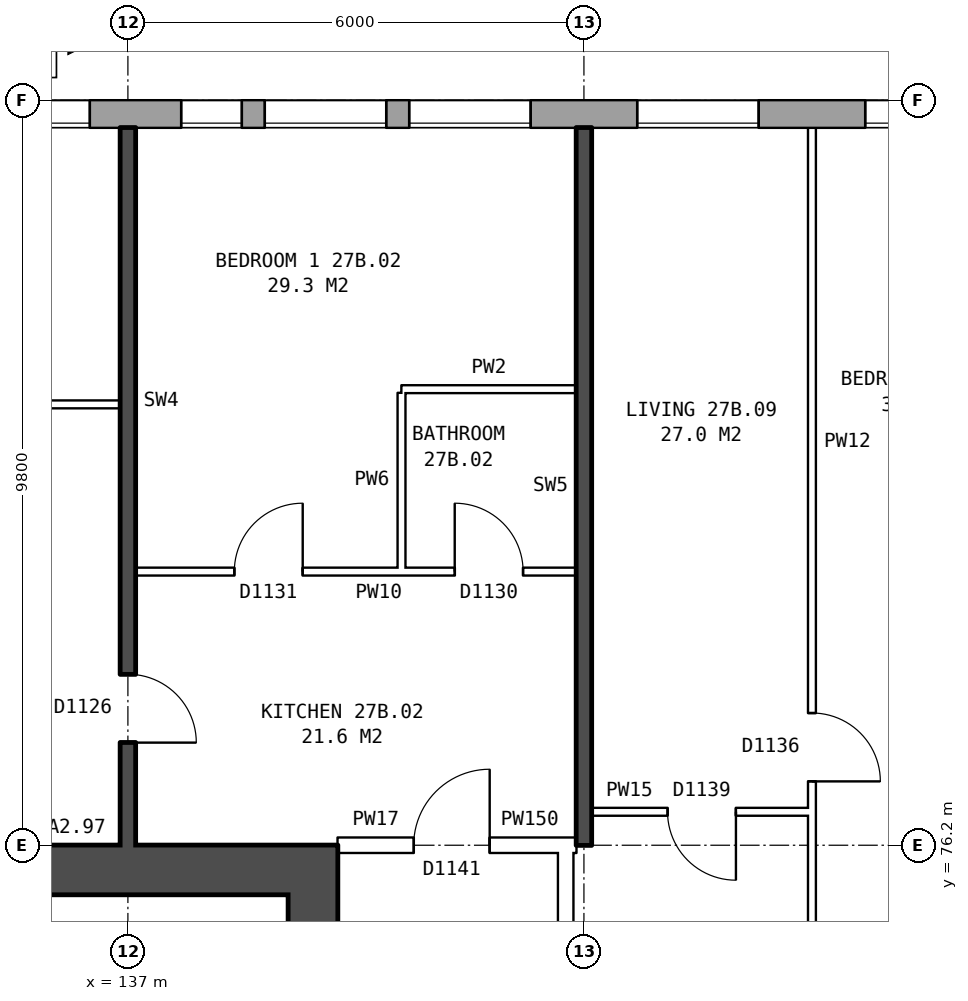
"""IFC4 building model, lengths in metres.
Left out: names, types, materials, properties, quantities, classifications, styles, units other than length and angle.
Written with IfcOpenShell. Run it as: python <this file> out.ifc"""

import sys

from ifc_helpers import new_model, si_unit, direction, frame, frame_2d, origin, place, context, subcontext, project, spatial, rectangle, extrude, element, fill, save


model = new_model("IFC4")
c1 = context("Model", 3, precision=1e-05, world=origin(), true_north=direction((0.0, 1.0)))
c2 = subcontext(c1, "Body", "Model", "MODEL_VIEW")
j1 = project(units=[si_unit("LENGTHUNIT", "METRE"), si_unit("PLANEANGLEUNIT", "RADIAN")], contexts=[c1])
p1 = place(None, origin())
s1 = spatial("IfcSite", under=j1, at=p1, CompositionType="ELEMENT")
p2 = place(p1, origin())
s2 = spatial("IfcBuilding", under=s1, at=p2, CompositionType="ELEMENT")
p3 = place(p2, frame((0.0, 0.0, 99.5)))
s3 = spatial("IfcBuildingStorey", under=s2, at=p3, CompositionType="ELEMENT", Elevation=99.5)
p4 = place(p3, frame((170.925, 85.82, 0.0), z_axis=(0.0, 0.0, 1.0), x_axis=(-1.0, 0.0, 0.0)))
e1 = element("IfcWall", 1, at=p4, inside=s3, PredefinedType="STANDARD", context=c2, shape_type="SweptSolid", body=[
    extrude(rectangle(XDim=36.851, YDim=0.36, at=frame_2d((18.425, 0.0))), origin(), (0.0, 0.0, 1.0), 2.85),
])
p5 = place(p4, frame((0.3, 0.0, 0.8)))
e2 = element("IfcOpeningElement", 2, at=p5, cuts=e1, PredefinedType="OPENING", context=c2, shape_type="SweptSolid", body=[
    extrude(rectangle(XDim=1.0, YDim=1.8, at=frame_2d((0.5, 0.9))), frame((0.0, 0.19, 0.0), z_axis=(0.0, -1.0, 0.0), x_axis=(1.0, 0.0, 0.0)), (0.0, 0.0, 1.0), 0.38),
])
p6 = place(p4, frame((4.625, 0.0, 0.8)))
e3 = element("IfcOpeningElement", 3, at=p6, cuts=e1, PredefinedType="OPENING", context=c2, shape_type="SweptSolid", body=[
    extrude(rectangle(XDim=1.6, YDim=1.8, at=frame_2d((0.8, 0.9))), frame((0.0, 0.19, 0.0), z_axis=(0.0, -1.0, 0.0), x_axis=(1.0, 0.0, 0.0)), (0.0, 0.0, 1.0), 0.38),
])
p7 = place(p4, frame((7.625, 0.0, 0.8)))
e4 = element("IfcOpeningElement", 4, at=p7, cuts=e1, PredefinedType="OPENING", context=c2, shape_type="SweptSolid", body=[
    extrude(rectangle(XDim=1.6, YDim=1.8, at=frame_2d((0.8, 0.9))), frame((0.0, 0.19, 0.0), z_axis=(0.0, -1.0, 0.0), x_axis=(1.0, 0.0, 0.0)), (0.0, 0.0, 1.0), 0.38),
])
p8 = place(p4, frame((10.625, 0.0, 0.8)))
e5 = element("IfcOpeningElement", 5, at=p8, cuts=e1, PredefinedType="OPENING", context=c2, shape_type="SweptSolid", body=[
    extrude(rectangle(XDim=1.6, YDim=1.8, at=frame_2d((0.8, 0.9))), frame((0.0, 0.19, 0.0), z_axis=(0.0, -1.0, 0.0), x_axis=(1.0, 0.0, 0.0)), (0.0, 0.0, 1.0), 0.38),
])
p9 = place(p4, frame((13.625, 0.0, 0.8)))
e6 = element("IfcOpeningElement", 6, at=p9, cuts=e1, PredefinedType="OPENING", context=c2, shape_type="SweptSolid", body=[
    extrude(rectangle(XDim=1.6, YDim=1.8, at=frame_2d((0.8, 0.9))), frame((0.0, 0.19, 0.0), z_axis=(0.0, -1.0, 0.0), x_axis=(1.0, 0.0, 0.0)), (0.0, 0.0, 1.0), 0.38),
])
p10 = place(p4, frame((16.625, 0.0, 0.8)))
e7 = element("IfcOpeningElement", 7, at=p10, cuts=e1, PredefinedType="OPENING", context=c2, shape_type="SweptSolid", body=[
    extrude(rectangle(XDim=1.6, YDim=1.8, at=frame_2d((0.8, 0.9))), frame((0.0, 0.19, 0.0), z_axis=(0.0, -1.0, 0.0), x_axis=(1.0, 0.0, 0.0)), (0.0, 0.0, 1.0), 0.38),
])
p11 = place(p4, frame((19.625, 0.0, 0.8)))
e8 = element("IfcOpeningElement", 8, at=p11, cuts=e1, PredefinedType="OPENING", context=c2, shape_type="SweptSolid", body=[
    extrude(rectangle(XDim=1.6, YDim=1.8, at=frame_2d((0.8, 0.9))), frame((0.0, 0.19, 0.0), z_axis=(0.0, -1.0, 0.0), x_axis=(1.0, 0.0, 0.0)), (0.0, 0.0, 1.0), 0.38),
])
p12 = place(p4, frame((22.625, 0.0, 0.8)))
e9 = element("IfcOpeningElement", 9, at=p12, cuts=e1, PredefinedType="OPENING", context=c2, shape_type="SweptSolid", body=[
    extrude(rectangle(XDim=1.6, YDim=1.8, at=frame_2d((0.8, 0.9))), frame((0.0, 0.19, 0.0), z_axis=(0.0, -1.0, 0.0), x_axis=(1.0, 0.0, 0.0)), (0.0, 0.0, 1.0), 0.38),
])
p13 = place(p4, frame((25.625, 0.0, 0.8)))
e10 = element("IfcOpeningElement", 10, at=p13, cuts=e1, PredefinedType="OPENING", context=c2, shape_type="SweptSolid", body=[
    extrude(rectangle(XDim=1.6, YDim=1.8, at=frame_2d((0.8, 0.9))), frame((0.0, 0.19, 0.0), z_axis=(0.0, -1.0, 0.0), x_axis=(1.0, 0.0, 0.0)), (0.0, 0.0, 1.0), 0.38),
])
p14 = place(p4, frame((28.625, 0.0, 0.8)))
e11 = element("IfcOpeningElement", 11, at=p14, cuts=e1, PredefinedType="OPENING", context=c2, shape_type="SweptSolid", body=[
    extrude(rectangle(XDim=1.6, YDim=1.8, at=frame_2d((0.8, 0.9))), frame((0.0, 0.19, 0.0), z_axis=(0.0, -1.0, 0.0), x_axis=(1.0, 0.0, 0.0)), (0.0, 0.0, 1.0), 0.38),
])
p15 = place(p4, frame((30.525, 0.0, 0.8)))
e12 = element("IfcOpeningElement", 12, at=p15, cuts=e1, PredefinedType="OPENING", context=c2, shape_type="SweptSolid", body=[
    extrude(rectangle(XDim=1.6, YDim=1.8, at=frame_2d((0.8, 0.9))), frame((0.0, 0.19, 0.0), z_axis=(0.0, -1.0, 0.0), x_axis=(1.0, 0.0, 0.0)), (0.0, 0.0, 1.0), 0.38),
])
p16 = place(p4, frame((34.425, 0.0, 1.7)))
e13 = element("IfcOpeningElement", 13, at=p16, cuts=e1, PredefinedType="OPENING", context=c2, shape_type="SweptSolid", body=[
    extrude(rectangle(XDim=0.8, YDim=0.9, at=frame_2d((0.4, 0.45))), frame((0.0, 0.19, 0.0), z_axis=(0.0, -1.0, 0.0), x_axis=(1.0, 0.0, 0.0)), (0.0, 0.0, 1.0), 0.38),
])
p17 = place(p4, frame((1.6, 0.0, 1.7)))
e14 = element("IfcOpeningElement", 14, at=p17, cuts=e1, PredefinedType="OPENING", context=c2, shape_type="SweptSolid", body=[
    extrude(rectangle(XDim=0.8, YDim=0.9, at=frame_2d((0.4, 0.45))), frame((0.0, 0.19, 0.0), z_axis=(0.0, -1.0, 0.0), x_axis=(1.0, 0.0, 0.0)), (0.0, 0.0, 1.0), 0.38),
])
p18 = place(p4, frame((32.425, 0.0, 0.8)))
e15 = element("IfcOpeningElement", 15, at=p18, cuts=e1, PredefinedType="OPENING", context=c2, shape_type="SweptSolid", body=[
    extrude(rectangle(XDim=0.8, YDim=0.9, at=frame_2d((0.4, 0.45))), frame((0.0, 0.19, 0.0), z_axis=(0.0, -1.0, 0.0), x_axis=(1.0, 0.0, 0.0)), (0.0, 0.0, 1.0), 0.38),
])
p19 = place(p4, frame((35.525, 0.0, 0.8)))
e16 = element("IfcOpeningElement", 16, at=p19, cuts=e1, PredefinedType="OPENING", context=c2, shape_type="SweptSolid", body=[
    extrude(rectangle(XDim=1.0, YDim=1.8, at=frame_2d((0.5, 0.9))), frame((0.0, 0.19, 0.0), z_axis=(0.0, -1.0, 0.0), x_axis=(1.0, 0.0, 0.0)), (0.0, 0.0, 1.0), 0.38),
])
p20 = place(p3, frame((139.435, 64.45, 0.0), z_axis=(0.0, 0.0, 1.0), x_axis=(0.0, 1.0, 0.0)))
e17 = element("IfcWall", 17, at=p20, inside=s3, PredefinedType="SHEAR", context=c2, shape_type="SweptSolid", body=[
    extrude(rectangle(XDim=11.1, YDim=0.65, at=frame_2d((5.55, 0.0))), origin(), (0.0, 0.0, 1.0), 2.85),
])
p21 = place(p20, frame((0.675, 0.0, 0.0)))
e18 = element("IfcOpeningElement", 18, at=p21, cuts=e17, PredefinedType="OPENING", context=c2, shape_type="SweptSolid", body=[
    extrude(rectangle(XDim=1.1, YDim=2.1, at=frame_2d((0.55, 1.05))), frame((0.0, 0.335, 0.0), z_axis=(0.0, -1.0, 0.0), x_axis=(1.0, 0.0, 0.0)), (0.0, 0.0, 1.0), 0.67),
])
p22 = place(p20, frame((9.25, 0.0, 0.0)))
e19 = element("IfcOpeningElement", 19, at=p22, cuts=e17, PredefinedType="OPENING", context=c2, shape_type="SweptSolid", body=[
    extrude(rectangle(XDim=1.1, YDim=2.1, at=frame_2d((0.55, 1.05))), frame((0.0, 0.335, 0.0), z_axis=(0.0, -1.0, 0.0), x_axis=(1.0, 0.0, 0.0)), (0.0, 0.0, 1.0), 0.67),
])
p23 = place(p20, frame((7.475, 0.0, 0.0)))
e20 = element("IfcOpeningElement", 20, at=p23, cuts=e17, PredefinedType="OPENING", context=c2, shape_type="SweptSolid", body=[
    extrude(rectangle(XDim=0.85, YDim=2.1, at=frame_2d((0.425, 1.05))), frame((0.0, 0.335, 0.0), z_axis=(0.0, -1.0, 0.0), x_axis=(1.0, 0.0, 0.0)), (0.0, 0.0, 1.0), 0.67),
])
p24 = place(p3, frame((139.76, 75.875, 0.0), z_axis=(0.0, 0.0, 1.0), x_axis=(-1.0, 0.0, 0.0)))
e21 = element("IfcWall", 21, at=p24, inside=s3, PredefinedType="SHEAR", context=c2, shape_type="SweptSolid", body=[
    extrude(rectangle(XDim=8.4, YDim=0.65, at=frame_2d((4.2, 0.0))), origin(), (0.0, 0.0, 1.0), 2.85),
])
p25 = place(p3, frame((142.76, 63.9, 0.0), z_axis=(0.0, 0.0, 1.0), x_axis=(0.0, 1.0, 0.0)))
e22 = element("IfcWall", 22, at=p25, inside=s3, PredefinedType="PARTITIONING", context=c2, shape_type="SweptSolid", body=[
    extrude(rectangle(XDim=12.2, YDim=0.2, at=frame_2d((6.1, 0.0))), origin(), (0.0, 0.0, 1.0), 2.85),
])
p26 = place(p25, frame((5.1, 0.0, 0.0)))
e23 = element("IfcOpeningElement", 23, at=p26, cuts=e22, PredefinedType="OPENING", context=c2, shape_type="SweptSolid", body=[
    extrude(rectangle(XDim=2.0, YDim=2.1, at=frame_2d((1.0, 1.05))), frame((0.0, 0.11, 0.0), z_axis=(0.0, -1.0, 0.0), x_axis=(1.0, 0.0, 0.0)), (0.0, 0.0, 1.0), 0.22),
])
p27 = place(p3, frame((139.76, 76.2, 0.0), z_axis=(0.0, 0.0, 1.0), x_axis=(1.0, 0.0, 0.0)))
e24 = element("IfcWall", 24, at=p27, inside=s3, PredefinedType="PARTITIONING", context=c2, shape_type="SweptSolid", body=[
    extrude(rectangle(XDim=3.0, YDim=0.2, at=frame_2d((1.5, 0.0))), origin(), (0.0, 0.0, 1.0), 2.85),
])
p28 = place(p27, frame((1.0, 0.0, 0.0)))
e25 = element("IfcOpeningElement", 25, at=p28, cuts=e24, PredefinedType="OPENING", context=c2, shape_type="SweptSolid", body=[
    extrude(rectangle(XDim=1.0, YDim=2.1, at=frame_2d((0.5, 1.05))), frame((0.0, 0.11, 0.0), z_axis=(0.0, -1.0, 0.0), x_axis=(1.0, 0.0, 0.0)), (0.0, 0.0, 1.0), 0.22),
])
p29 = place(p3, frame((142.76, 76.2, 0.0), z_axis=(0.0, 0.0, 1.0), x_axis=(1.0, 0.0, 0.0)))
e26 = element("IfcWall", 26, at=p29, inside=s3, PredefinedType="PARTITIONING", context=c2, shape_type="SweptSolid", body=[
    extrude(rectangle(XDim=0.14, YDim=0.2, at=frame_2d((0.07, 0.0))), origin(), (0.0, 0.0, 1.0), 2.85),
])
p30 = place(p3, frame((143.1, 76.64, 0.0), z_axis=(0.0, 0.0, 1.0), x_axis=(1.0, 0.0, 0.0)))
e27 = element("IfcWall", 27, at=p30, inside=s3, PredefinedType="PARTITIONING", context=c2, shape_type="SweptSolid", body=[
    extrude(rectangle(XDim=2.9, YDim=0.1, at=frame_2d((1.45, 0.0))), origin(), (0.0, 0.0, 1.0), 2.85),
])
p31 = place(p30, frame((1.0, 0.0, 0.0)))
e28 = element("IfcOpeningElement", 28, at=p31, cuts=e27, PredefinedType="OPENING", context=c2, shape_type="SweptSolid", body=[
    extrude(rectangle(XDim=0.9, YDim=2.1, at=frame_2d((0.45, 1.05))), frame((0.0, 0.06, 0.0), z_axis=(0.0, -1.0, 0.0), x_axis=(1.0, 0.0, 0.0)), (0.0, 0.0, 1.0), 0.12),
])
p32 = place(p3, frame((137.1, 79.8, 0.0), z_axis=(0.0, 0.0, 1.0), x_axis=(1.0, 0.0, 0.0)))
e29 = element("IfcWall", 29, at=p32, inside=s3, PredefinedType="PARTITIONING", context=c2, shape_type="SweptSolid", body=[
    extrude(rectangle(XDim=5.8, YDim=0.1, at=frame_2d((2.9, 0.0))), origin(), (0.0, 0.0, 1.0), 2.85),
])
p33 = place(p32, frame((1.3, 0.0, 0.0)))
e30 = element("IfcOpeningElement", 30, at=p33, cuts=e29, PredefinedType="OPENING", context=c2, shape_type="SweptSolid", body=[
    extrude(rectangle(XDim=0.9, YDim=2.1, at=frame_2d((0.45, 1.05))), frame((0.0, 0.06, 0.0), z_axis=(0.0, -1.0, 0.0), x_axis=(1.0, 0.0, 0.0)), (0.0, 0.0, 1.0), 0.12),
])
p34 = place(p32, frame((4.2, 0.0, 0.0)))
e31 = element("IfcOpeningElement", 31, at=p34, cuts=e29, PredefinedType="OPENING", context=c2, shape_type="SweptSolid", body=[
    extrude(rectangle(XDim=0.9, YDim=2.1, at=frame_2d((0.45, 1.05))), frame((0.0, 0.06, 0.0), z_axis=(0.0, -1.0, 0.0), x_axis=(1.0, 0.0, 0.0)), (0.0, 0.0, 1.0), 0.12),
])
p35 = place(p3, frame((131.36, 82.0, 0.0), z_axis=(0.0, 0.0, 1.0), x_axis=(1.0, 0.0, 0.0)))
e32 = element("IfcWall", 32, at=p35, inside=s3, PredefinedType="PARTITIONING", context=c2, shape_type="SweptSolid", body=[
    extrude(rectangle(XDim=5.54, YDim=0.1, at=frame_2d((2.77, 0.0))), origin(), (0.0, 0.0, 1.0), 2.85),
])
p36 = place(p35, frame((2.32, 0.0, 0.0)))
e33 = element("IfcOpeningElement", 33, at=p36, cuts=e32, PredefinedType="OPENING", context=c2, shape_type="SweptSolid", body=[
    extrude(rectangle(XDim=0.9, YDim=2.1, at=frame_2d((0.45, 1.05))), frame((0.0, 0.06, 0.0), z_axis=(0.0, -1.0, 0.0), x_axis=(1.0, 0.0, 0.0)), (0.0, 0.0, 1.0), 0.12),
])
p37 = place(p3, frame((140.6, 82.2, 0.0), z_axis=(0.0, 0.0, 1.0), x_axis=(1.0, 0.0, 0.0)))
e34 = element("IfcWall", 34, at=p37, inside=s3, PredefinedType="PARTITIONING", context=c2, shape_type="SweptSolid", body=[
    extrude(rectangle(XDim=2.3, YDim=0.1, at=frame_2d((1.15, 0.0))), origin(), (0.0, 0.0, 1.0), 2.85),
])
p38 = place(p3, frame((137.0, 76.2, 0.0), z_axis=(0.0, 0.0, 1.0), x_axis=(0.0, 1.0, 0.0)))
e35 = element("IfcWall", 35, at=p38, inside=s3, PredefinedType="SOLIDWALL", context=c2, shape_type="SweptSolid", body=[
    extrude(rectangle(XDim=9.44, YDim=0.2, at=frame_2d((4.72, 0.0))), origin(), (0.0, 0.0, 1.0), 2.85),
])
p39 = place(p38, frame((1.35, 0.0, 0.0)))
e36 = element("IfcOpeningElement", 36, at=p39, cuts=e35, PredefinedType="OPENING", context=c2, shape_type="SweptSolid", body=[
    extrude(rectangle(XDim=0.9, YDim=2.1, at=frame_2d((0.45, 1.05))), frame((0.0, 0.11, 0.0), z_axis=(0.0, -1.0, 0.0), x_axis=(1.0, 0.0, 0.0)), (0.0, 0.0, 1.0), 0.22),
])
p40 = place(p3, frame((140.6, 79.85, 0.0), z_axis=(0.0, 0.0, 1.0), x_axis=(0.0, 1.0, 0.0)))
e37 = element("IfcWall", 37, at=p40, inside=s3, PredefinedType="PARTITIONING", context=c2, shape_type="SweptSolid", body=[
    extrude(rectangle(XDim=2.3, YDim=0.1, at=frame_2d((1.15, 0.0))), origin(), (0.0, 0.0, 1.0), 2.85),
])
p41 = place(p3, frame((143.0, 76.2, 0.0), z_axis=(0.0, 0.0, 1.0), x_axis=(0.0, 1.0, 0.0)))
e38 = element("IfcWall", 38, at=p41, inside=s3, PredefinedType="SOLIDWALL", context=c2, shape_type="SweptSolid", body=[
    extrude(rectangle(XDim=9.44, YDim=0.2, at=frame_2d((4.72, 0.0))), origin(), (0.0, 0.0, 1.0), 2.85),
])
p42 = place(p3, frame((146.0, 71.3, 0.0), z_axis=(0.0, 0.0, 1.0), x_axis=(0.0, 1.0, 0.0)))
e39 = element("IfcWall", 39, at=p42, inside=s3, PredefinedType="PARTITIONING", context=c2, shape_type="SweptSolid", body=[
    extrude(rectangle(XDim=14.34, YDim=0.1, at=frame_2d((7.17, 0.0))), origin(), (0.0, 0.0, 1.0), 2.85),
])
p43 = place(p42, frame((5.74, 0.0, 0.0)))
e40 = element("IfcOpeningElement", 40, at=p43, cuts=e39, PredefinedType="OPENING", context=c2, shape_type="SweptSolid", body=[
    extrude(rectangle(XDim=0.9, YDim=2.1, at=frame_2d((0.45, 1.05))), frame((0.0, 0.06, 0.0), z_axis=(0.0, -1.0, 0.0), x_axis=(1.0, 0.0, 0.0)), (0.0, 0.0, 1.0), 0.12),
])
p44 = place(p42, frame((0.4, 0.0, 0.0)))
e41 = element("IfcOpeningElement", 41, at=p44, cuts=e39, PredefinedType="OPENING", context=c2, shape_type="SweptSolid", body=[
    extrude(rectangle(XDim=0.9, YDim=2.1, at=frame_2d((0.45, 1.05))), frame((0.0, 0.06, 0.0), z_axis=(0.0, -1.0, 0.0), x_axis=(1.0, 0.0, 0.0)), (0.0, 0.0, 1.0), 0.12),
])
p45 = place(p12, origin())
e42 = element("IfcWindow", 42, at=p45, inside=s3, PartitioningType="SINGLE_PANEL", PredefinedType="WINDOW", context=c2, shape_type="SweptSolid", body=[
    extrude(rectangle(XDim=1.6, YDim=1.8, at=frame_2d((0.8, 0.9))), frame((0.0, 0.15, 0.0), z_axis=(0.0, -1.0, 0.0), x_axis=(1.0, 0.0, 0.0)), (0.0, 0.0, 1.0), 0.06),
])
fill(e9, e42)
p46 = place(p13, origin())
e43 = element("IfcWindow", 43, at=p46, inside=s3, PartitioningType="SINGLE_PANEL", PredefinedType="WINDOW", context=c2, shape_type="SweptSolid", body=[
    extrude(rectangle(XDim=1.6, YDim=1.8, at=frame_2d((0.8, 0.9))), frame((0.0, 0.15, 0.0), z_axis=(0.0, -1.0, 0.0), x_axis=(1.0, 0.0, 0.0)), (0.0, 0.0, 1.0), 0.06),
])
fill(e10, e43)
p47 = place(p14, origin())
e44 = element("IfcWindow", 44, at=p47, inside=s3, PartitioningType="SINGLE_PANEL", PredefinedType="WINDOW", context=c2, shape_type="SweptSolid", body=[
    extrude(rectangle(XDim=1.6, YDim=1.8, at=frame_2d((0.8, 0.9))), frame((0.0, 0.15, 0.0), z_axis=(0.0, -1.0, 0.0), x_axis=(1.0, 0.0, 0.0)), (0.0, 0.0, 1.0), 0.06),
])
fill(e11, e44)
p48 = place(p15, origin())
e45 = element("IfcWindow", 45, at=p48, inside=s3, PartitioningType="SINGLE_PANEL", PredefinedType="WINDOW", context=c2, shape_type="SweptSolid", body=[
    extrude(rectangle(XDim=1.6, YDim=1.8, at=frame_2d((0.8, 0.9))), frame((0.0, 0.15, 0.0), z_axis=(0.0, -1.0, 0.0), x_axis=(1.0, 0.0, 0.0)), (0.0, 0.0, 1.0), 0.06),
])
fill(e12, e45)
p49 = place(p16, origin())
e46 = element("IfcWindow", 46, at=p49, inside=s3, PartitioningType="SINGLE_PANEL", PredefinedType="WINDOW", context=c2, shape_type="SweptSolid", body=[
    extrude(rectangle(XDim=0.8, YDim=0.9, at=frame_2d((0.4, 0.45))), frame((0.0, 0.15, 0.0), z_axis=(0.0, -1.0, 0.0), x_axis=(1.0, 0.0, 0.0)), (0.0, 0.0, 1.0), 0.06),
])
fill(e13, e46)
p50 = place(p33, origin())
e47 = element("IfcDoor", 47, at=p50, inside=s3, OperationType="SINGLE_SWING_RIGHT", PredefinedType="DOOR", context=c2, shape_type="SweptSolid", body=[
    extrude(rectangle(XDim=0.9, YDim=2.1, at=frame_2d((0.45, 1.05))), frame((0.0, 0.025, 0.0), z_axis=(0.0, -1.0, 0.0), x_axis=(1.0, 0.0, 0.0)), (0.0, 0.0, 1.0), 0.05),
])
fill(e30, e47)
p51 = place(p28, origin())
e48 = element("IfcDoor", 48, at=p51, inside=s3, OperationType="SINGLE_SWING_RIGHT", PredefinedType="DOOR", context=c2, shape_type="SweptSolid", body=[
    extrude(rectangle(XDim=1.0, YDim=2.1, at=frame_2d((0.5, 1.05))), frame((0.0, 0.025, 0.0), z_axis=(0.0, -1.0, 0.0), x_axis=(1.0, 0.0, 0.0)), (0.0, 0.0, 1.0), 0.05),
])
fill(e25, e48)
p52 = place(p39, frame((0.9, 0.0, 0.0), z_axis=(0.0, 0.0, 1.0), x_axis=(-1.0, 0.0, 0.0)))
e49 = element("IfcDoor", 49, at=p52, inside=s3, OperationType="SINGLE_SWING_RIGHT", PredefinedType="DOOR", context=c2, shape_type="SweptSolid", body=[
    extrude(rectangle(XDim=0.9, YDim=2.1, at=frame_2d((0.45, 1.05))), frame((0.0, 0.025, 0.0), z_axis=(0.0, -1.0, 0.0), x_axis=(1.0, 0.0, 0.0)), (0.0, 0.0, 1.0), 0.05),
])
fill(e36, e49)
p53 = place(p34, origin())
e50 = element("IfcDoor", 50, at=p53, inside=s3, OperationType="SINGLE_SWING_LEFT", PredefinedType="DOOR", context=c2, shape_type="SweptSolid", body=[
    extrude(rectangle(XDim=0.9, YDim=2.1, at=frame_2d((0.45, 1.05))), frame((0.0, 0.025, 0.0), z_axis=(0.0, -1.0, 0.0), x_axis=(1.0, 0.0, 0.0)), (0.0, 0.0, 1.0), 0.05),
])
fill(e31, e50)
p54 = place(p43, frame((0.9, 0.0, 0.0), z_axis=(0.0, 0.0, 1.0), x_axis=(-1.0, 0.0, 0.0)))
e51 = element("IfcDoor", 51, at=p54, inside=s3, OperationType="SINGLE_SWING_RIGHT", PredefinedType="DOOR", context=c2, shape_type="SweptSolid", body=[
    extrude(rectangle(XDim=0.9, YDim=2.1, at=frame_2d((0.45, 1.05))), frame((0.0, 0.025, 0.0), z_axis=(0.0, -1.0, 0.0), x_axis=(1.0, 0.0, 0.0)), (0.0, 0.0, 1.0), 0.05),
])
fill(e40, e51)
p55 = place(p31, frame((0.9, 0.0, 0.0), z_axis=(0.0, 0.0, 1.0), x_axis=(-1.0, 0.0, 0.0)))
e52 = element("IfcDoor", 52, at=p55, inside=s3, OperationType="SINGLE_SWING_LEFT", PredefinedType="DOOR", context=c2, shape_type="SweptSolid", body=[
    extrude(rectangle(XDim=0.9, YDim=2.1, at=frame_2d((0.45, 1.05))), frame((0.0, 0.025, 0.0), z_axis=(0.0, -1.0, 0.0), x_axis=(1.0, 0.0, 0.0)), (0.0, 0.0, 1.0), 0.05),
])
fill(e28, e52)
p56 = place(p18, origin())
e53 = element("IfcWindow", 53, at=p56, inside=s3, PartitioningType="SINGLE_PANEL", PredefinedType="WINDOW", context=c2, shape_type="SweptSolid", body=[
    extrude(rectangle(XDim=0.8, YDim=0.9, at=frame_2d((0.4, 0.45))), frame((0.0, 0.15, 0.0), z_axis=(0.0, -1.0, 0.0), x_axis=(1.0, 0.0, 0.0)), (0.0, 0.0, 1.0), 0.06),
])
fill(e15, e53)
save(model, sys.argv[1])
